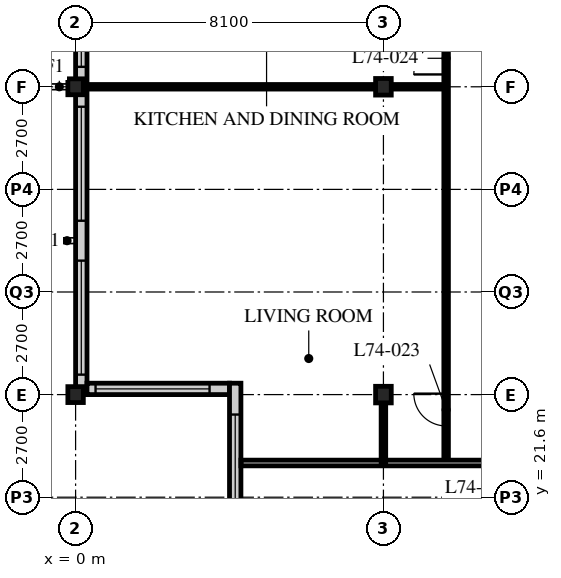
"""IFC4 building model, lengths in metres.
Left out: names, types, materials, properties, quantities, classifications, styles, units other than length and angle.
Written with IfcOpenShell. Run it as: python <this file> out.ifc"""

import sys

from ifc_helpers import new_model, si_unit, direction, frame, frame_2d, origin, origin_2d, place, context, subcontext, project, spatial, rectangle, i_section, extrude, element, fill, save


model = new_model("IFC4")
c1 = context("Model", 3, precision=1e-05, world=origin(), true_north=direction((0.0, 1.0)))
c2 = subcontext(c1, "Body", "Model", "MODEL_VIEW")
j1 = project(units=[si_unit("LENGTHUNIT", "METRE"), si_unit("PLANEANGLEUNIT", "RADIAN")], contexts=[c1])
p1 = place(None, origin())
s1 = spatial("IfcSite", under=j1, at=p1, CompositionType="ELEMENT")
p2 = place(p1, origin())
s2 = spatial("IfcBuilding", under=s1, at=p2, CompositionType="ELEMENT")
p3 = place(p2, frame((0.0, 0.0, 289.2)))
s3 = spatial("IfcBuildingStorey", under=s2, at=p3, CompositionType="ELEMENT", Elevation=289.2)
for number, where, z_axis, x_axis in (
    (1, (0.0, 24.3, 0.0), (0.0, 0.0, 1.0), (1.0, 0.0, 0.0)),
    (2, (0.0, 32.4, 0.0), (0.0, 0.0, 1.0), (1.0, 0.0, 0.0)),
):
    element("IfcColumn", number, at=place(p3, frame(where, z_axis=z_axis, x_axis=x_axis)), inside=s3, PredefinedType="COLUMN", context=c2, shape_type="SweptSolid", body=[
        extrude(i_section(OverallWidth=0.407, OverallDepth=0.419, WebThickness=0.031, FlangeThickness=0.049, FilletRadius=0.015, at=origin_2d()), origin(), (0.0, 0.0, 1.0), 3.9),
    ])
for number, where, z_axis, x_axis in (
    (3, (8.1, 24.3, 0.0), (0.0, 0.0, 1.0), (1.0, 0.0, 0.0)),
    (4, (8.1, 32.4, 0.0), (0.0, 0.0, 1.0), (1.0, 0.0, 0.0)),
):
    element("IfcColumn", number, at=place(p3, frame(where, z_axis=z_axis, x_axis=x_axis)), inside=s3, PredefinedType="COLUMN", context=c2, shape_type="SweptSolid", body=[
        extrude(i_section(OverallWidth=0.412, OverallDepth=0.437, WebThickness=0.036, FlangeThickness=0.058, FilletRadius=0.015, at=origin_2d()), origin(), (0.0, 0.0, 1.0), 3.9),
    ])
p4 = place(p3, frame((0.15, 56.4, 0.0), z_axis=(0.0, 0.0, 1.0), x_axis=(0.0, -1.0, 0.0)))
e5 = element("IfcWall", 5, at=p4, inside=s3, PredefinedType="SOLIDWALL", context=c2, shape_type="SweptSolid", body=[
    extrude(rectangle(XDim=32.1, YDim=0.3, at=frame_2d((16.05, 0.0))), origin(), (0.0, 0.0, 1.0), 3.69),
])
p5 = place(p4, frame((0.225, 0.0, 0.6)))
e6 = element("IfcOpeningElement", 6, at=p5, cuts=e5, PredefinedType="OPENING", context=c2, shape_type="SweptSolid", body=[
    extrude(rectangle(XDim=3.0, YDim=2.4, at=frame_2d((1.5, 1.2))), frame((0.0, 0.16, 0.0), z_axis=(0.0, -1.0, 0.0), x_axis=(1.0, 0.0, 0.0)), (0.0, 0.0, 1.0), 0.32),
])
p6 = place(p4, frame((4.275, 0.0, 0.6)))
e7 = element("IfcOpeningElement", 7, at=p6, cuts=e5, PredefinedType="OPENING", context=c2, shape_type="SweptSolid", body=[
    extrude(rectangle(XDim=3.0, YDim=2.4, at=frame_2d((1.5, 1.2))), frame((0.0, 0.16, 0.0), z_axis=(0.0, -1.0, 0.0), x_axis=(1.0, 0.0, 0.0)), (0.0, 0.0, 1.0), 0.32),
])
p7 = place(p4, frame((8.325, 0.0, 0.6)))
e8 = element("IfcOpeningElement", 8, at=p7, cuts=e5, PredefinedType="OPENING", context=c2, shape_type="SweptSolid", body=[
    extrude(rectangle(XDim=3.0, YDim=2.4, at=frame_2d((1.5, 1.2))), frame((0.0, 0.16, 0.0), z_axis=(0.0, -1.0, 0.0), x_axis=(1.0, 0.0, 0.0)), (0.0, 0.0, 1.0), 0.32),
])
p8 = place(p4, frame((12.375, 0.0, 0.6)))
e9 = element("IfcOpeningElement", 9, at=p8, cuts=e5, PredefinedType="OPENING", context=c2, shape_type="SweptSolid", body=[
    extrude(rectangle(XDim=3.0, YDim=2.4, at=frame_2d((1.5, 1.2))), frame((0.0, 0.16, 0.0), z_axis=(0.0, -1.0, 0.0), x_axis=(1.0, 0.0, 0.0)), (0.0, 0.0, 1.0), 0.32),
])
p9 = place(p4, frame((16.425, 0.0, 0.6)))
e10 = element("IfcOpeningElement", 10, at=p9, cuts=e5, PredefinedType="OPENING", context=c2, shape_type="SweptSolid", body=[
    extrude(rectangle(XDim=3.0, YDim=2.4, at=frame_2d((1.5, 1.2))), frame((0.0, 0.16, 0.0), z_axis=(0.0, -1.0, 0.0), x_axis=(1.0, 0.0, 0.0)), (0.0, 0.0, 1.0), 0.32),
])
p10 = place(p4, frame((20.475, 0.0, 0.6)))
e11 = element("IfcOpeningElement", 11, at=p10, cuts=e5, PredefinedType="OPENING", context=c2, shape_type="SweptSolid", body=[
    extrude(rectangle(XDim=3.0, YDim=2.4, at=frame_2d((1.5, 1.2))), frame((0.0, 0.16, 0.0), z_axis=(0.0, -1.0, 0.0), x_axis=(1.0, 0.0, 0.0)), (0.0, 0.0, 1.0), 0.32),
])
p11 = place(p4, frame((24.525, 0.0, 0.6)))
e12 = element("IfcOpeningElement", 12, at=p11, cuts=e5, PredefinedType="OPENING", context=c2, shape_type="SweptSolid", body=[
    extrude(rectangle(XDim=3.0, YDim=2.4, at=frame_2d((1.5, 1.2))), frame((0.0, 0.16, 0.0), z_axis=(0.0, -1.0, 0.0), x_axis=(1.0, 0.0, 0.0)), (0.0, 0.0, 1.0), 0.32),
])
p12 = place(p4, frame((28.575, 0.0, 0.6)))
e13 = element("IfcOpeningElement", 13, at=p12, cuts=e5, PredefinedType="OPENING", context=c2, shape_type="SweptSolid", body=[
    extrude(rectangle(XDim=3.0, YDim=2.4, at=frame_2d((1.5, 1.2))), frame((0.0, 0.16, 0.0), z_axis=(0.0, -1.0, 0.0), x_axis=(1.0, 0.0, 0.0)), (0.0, 0.0, 1.0), 0.32),
])
p13 = place(p3, frame((0.3, 24.45, 0.0), z_axis=(0.0, 0.0, 1.0), x_axis=(1.0, 0.0, 0.0)))
e14 = element("IfcWall", 14, at=p13, inside=s3, PredefinedType="SOLIDWALL", context=c2, shape_type="SweptSolid", body=[
    extrude(rectangle(XDim=3.75, YDim=0.3, at=frame_2d((1.875, 0.0))), origin(), (0.0, 0.0, 1.0), 3.69),
])
p14 = place(p13, frame((0.225, 0.0, 0.6)))
e15 = element("IfcOpeningElement", 15, at=p14, cuts=e14, PredefinedType="OPENING", context=c2, shape_type="SweptSolid", body=[
    extrude(rectangle(XDim=3.0, YDim=2.3, at=frame_2d((1.5, 1.15))), frame((0.0, 0.16, 0.0), z_axis=(0.0, -1.0, 0.0), x_axis=(1.0, 0.0, 0.0)), (0.0, 0.0, 1.0), 0.32),
])
p15 = place(p3, frame((4.2, 24.6, 0.0), z_axis=(0.0, 0.0, 1.0), x_axis=(0.0, -1.0, 0.0)))
e16 = element("IfcWall", 16, at=p15, inside=s3, PredefinedType="SOLIDWALL", context=c2, shape_type="SweptSolid", body=[
    extrude(rectangle(XDim=4.35, YDim=0.3, at=frame_2d((2.175, 0.0))), origin(), (0.0, 0.0, 1.0), 3.69),
])
p16 = place(p15, frame((0.825, 0.0, 0.6)))
e17 = element("IfcOpeningElement", 17, at=p16, cuts=e16, PredefinedType="OPENING", context=c2, shape_type="SweptSolid", body=[
    extrude(rectangle(XDim=3.0, YDim=2.3, at=frame_2d((1.5, 1.15))), frame((0.0, 0.16, 0.0), z_axis=(0.0, -1.0, 0.0), x_axis=(1.0, 0.0, 0.0)), (0.0, 0.0, 1.0), 0.32),
])
p17 = place(p3, frame((9.75, 22.5, 0.0), z_axis=(0.0, 0.0, 1.0), x_axis=(0.0, 1.0, 0.0)))
e18 = element("IfcWall", 18, at=p17, inside=s3, PredefinedType="PARTITIONING", context=c2, shape_type="SweptSolid", body=[
    extrude(rectangle(XDim=26.1, YDim=0.12, at=frame_2d((13.05, 0.0))), origin(), (0.0, 0.0, 1.0), 3.69),
])
p18 = place(p17, frame((0.975, 0.0, 0.0)))
e19 = element("IfcOpeningElement", 19, at=p18, cuts=e18, PredefinedType="OPENING", context=c2, shape_type="SweptSolid", body=[
    extrude(rectangle(XDim=0.85, YDim=2.1, at=frame_2d((0.425, 1.05))), frame((0.0, 0.07, 0.0), z_axis=(0.0, -1.0, 0.0), x_axis=(1.0, 0.0, 0.0)), (0.0, 0.0, 1.0), 0.14),
])
p19 = place(p17, frame((10.225, 0.0, 0.0)))
e20 = element("IfcOpeningElement", 20, at=p19, cuts=e18, PredefinedType="OPENING", context=c2, shape_type="SweptSolid", body=[
    extrude(rectangle(XDim=0.85, YDim=2.1, at=frame_2d((0.425, 1.05))), frame((0.0, 0.07, 0.0), z_axis=(0.0, -1.0, 0.0), x_axis=(1.0, 0.0, 0.0)), (0.0, 0.0, 1.0), 0.14),
])
p20 = place(p17, frame((14.275, 0.0, 0.0)))
e21 = element("IfcOpeningElement", 21, at=p20, cuts=e18, PredefinedType="OPENING", context=c2, shape_type="SweptSolid", body=[
    extrude(rectangle(XDim=0.85, YDim=2.1, at=frame_2d((0.425, 1.05))), frame((0.0, 0.07, 0.0), z_axis=(0.0, -1.0, 0.0), x_axis=(1.0, 0.0, 0.0)), (0.0, 0.0, 1.0), 0.14),
])
p21 = place(p17, frame((18.325, 0.0, 0.0)))
e22 = element("IfcOpeningElement", 22, at=p21, cuts=e18, PredefinedType="OPENING", context=c2, shape_type="SweptSolid", body=[
    extrude(rectangle(XDim=0.85, YDim=2.1, at=frame_2d((0.425, 1.05))), frame((0.0, 0.07, 0.0), z_axis=(0.0, -1.0, 0.0), x_axis=(1.0, 0.0, 0.0)), (0.0, 0.0, 1.0), 0.14),
])
p22 = place(p17, frame((22.375, 0.0, 0.0)))
e23 = element("IfcOpeningElement", 23, at=p22, cuts=e18, PredefinedType="OPENING", context=c2, shape_type="SweptSolid", body=[
    extrude(rectangle(XDim=0.85, YDim=2.1, at=frame_2d((0.425, 1.05))), frame((0.0, 0.07, 0.0), z_axis=(0.0, -1.0, 0.0), x_axis=(1.0, 0.0, 0.0)), (0.0, 0.0, 1.0), 0.14),
])
p23 = place(p3, frame((9.75, 32.4, 0.0), z_axis=(0.0, 0.0, 1.0), x_axis=(-1.0, 0.0, 0.0)))
e24 = element("IfcWall", 24, at=p23, inside=s3, PredefinedType="PARTITIONING", context=c2, shape_type="SweptSolid", body=[
    extrude(rectangle(XDim=9.45, YDim=0.12, at=frame_2d((4.725, 0.0))), origin(), (0.0, 0.0, 1.0), 3.078),
])
p24 = place(p3, frame((4.35, 22.5, 0.0), z_axis=(0.0, 0.0, 1.0), x_axis=(1.0, 0.0, 0.0)))
e25 = element("IfcWall", 25, at=p24, inside=s3, PredefinedType="PARTITIONING", context=c2, shape_type="SweptSolid", body=[
    extrude(rectangle(XDim=7.8, YDim=0.15, at=frame_2d((3.9, 0.0))), origin(), (0.0, 0.0, 1.0), 3.69),
])
p25 = place(p3, frame((8.1, 22.5, 0.0), z_axis=(0.0, 0.0, 1.0), x_axis=(0.0, 1.0, 0.0)))
e26 = element("IfcWall", 26, at=p25, inside=s3, PredefinedType="PARTITIONING", context=c2, shape_type="SweptSolid", body=[
    extrude(rectangle(XDim=1.597, YDim=0.12, at=frame_2d((0.798, 0.0))), origin(), (0.0, 0.0, 1.0), 3.078),
])
p26 = place(p10, origin())
e27 = element("IfcWindow", 27, at=p26, inside=s3, PartitioningType="SINGLE_PANEL", PredefinedType="WINDOW", context=c2, shape_type="SweptSolid", body=[
    extrude(rectangle(XDim=3.0, YDim=2.4, at=frame_2d((1.5, 1.2))), frame((0.0, 0.03, 0.0), z_axis=(0.0, -1.0, 0.0), x_axis=(1.0, 0.0, 0.0)), (0.0, 0.0, 1.0), 0.06),
])
fill(e11, e27)
p27 = place(p11, origin())
e28 = element("IfcWindow", 28, at=p27, inside=s3, PartitioningType="SINGLE_PANEL", PredefinedType="WINDOW", context=c2, shape_type="SweptSolid", body=[
    extrude(rectangle(XDim=3.0, YDim=2.4, at=frame_2d((1.5, 1.2))), frame((0.0, 0.03, 0.0), z_axis=(0.0, -1.0, 0.0), x_axis=(1.0, 0.0, 0.0)), (0.0, 0.0, 1.0), 0.06),
])
fill(e12, e28)
p28 = place(p12, origin())
e29 = element("IfcWindow", 29, at=p28, inside=s3, PartitioningType="SINGLE_PANEL", PredefinedType="WINDOW", context=c2, shape_type="SweptSolid", body=[
    extrude(rectangle(XDim=3.0, YDim=2.4, at=frame_2d((1.5, 1.2))), frame((0.0, 0.03, 0.0), z_axis=(0.0, -1.0, 0.0), x_axis=(1.0, 0.0, 0.0)), (0.0, 0.0, 1.0), 0.06),
])
fill(e13, e29)
p29 = place(p14, origin())
e30 = element("IfcWindow", 30, at=p29, inside=s3, PartitioningType="SINGLE_PANEL", PredefinedType="WINDOW", context=c2, shape_type="SweptSolid", body=[
    extrude(rectangle(XDim=3.0, YDim=2.3, at=frame_2d((1.5, 1.15))), frame((0.0, 0.03, 0.0), z_axis=(0.0, -1.0, 0.0), x_axis=(1.0, 0.0, 0.0)), (0.0, 0.0, 1.0), 0.06),
])
fill(e15, e30)
p30 = place(p16, origin())
e31 = element("IfcWindow", 31, at=p30, inside=s3, PartitioningType="SINGLE_PANEL", PredefinedType="WINDOW", context=c2, shape_type="SweptSolid", body=[
    extrude(rectangle(XDim=3.0, YDim=2.3, at=frame_2d((1.5, 1.15))), frame((0.0, 0.03, 0.0), z_axis=(0.0, -1.0, 0.0), x_axis=(1.0, 0.0, 0.0)), (0.0, 0.0, 1.0), 0.06),
])
fill(e17, e31)
p31 = place(p18, origin())
e32 = element("IfcDoor", 32, at=p31, inside=s3, OperationType="SINGLE_SWING_RIGHT", PredefinedType="DOOR", context=c2, shape_type="SweptSolid", body=[
    extrude(rectangle(XDim=0.85, YDim=2.1, at=frame_2d((0.425, 1.05))), frame((0.0, 0.025, 0.0), z_axis=(0.0, -1.0, 0.0), x_axis=(1.0, 0.0, 0.0)), (0.0, 0.0, 1.0), 0.05),
])
fill(e19, e32)
p32 = place(p19, origin())
e33 = element("IfcDoor", 33, at=p32, inside=s3, OperationType="SINGLE_SWING_LEFT", PredefinedType="DOOR", context=c2, shape_type="SweptSolid", body=[
    extrude(rectangle(XDim=0.85, YDim=2.1, at=frame_2d((0.425, 1.05))), frame((0.0, 0.025, 0.0), z_axis=(0.0, -1.0, 0.0), x_axis=(1.0, 0.0, 0.0)), (0.0, 0.0, 1.0), 0.05),
])
fill(e20, e33)
save(model, sys.argv[1])
